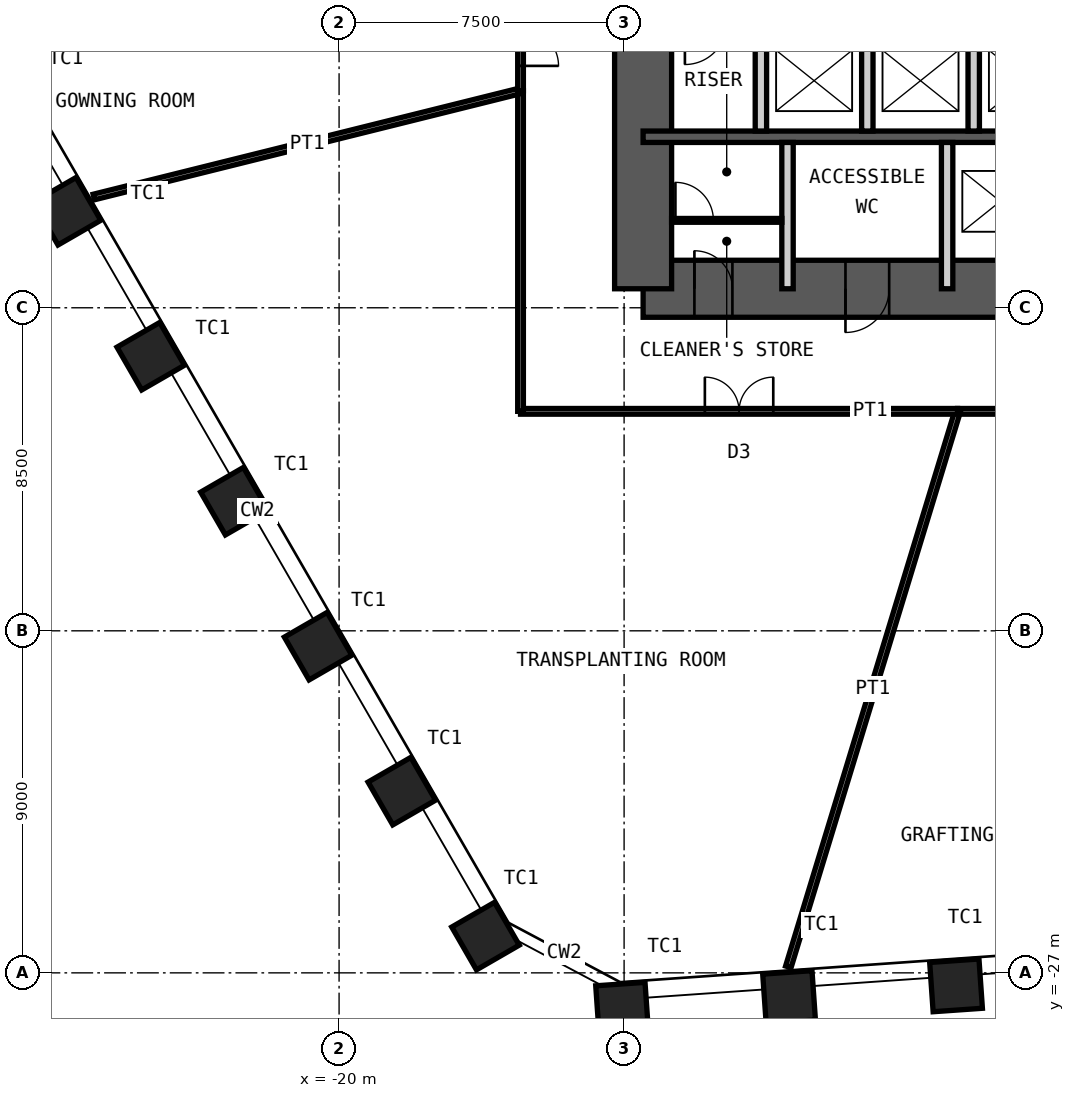
"""IFC4 building model, lengths in metres.
Left out: names, types, materials, properties, quantities, classifications, styles, units other than length and angle.
Written with IfcOpenShell. Run it as: python <this file> out.ifc"""

import sys

from ifc_helpers import new_model, si_unit, direction, frame, frame_2d, origin, origin_2d, place, context, subcontext, project, spatial, rectangle, hollow_rectangle, extrude, element, fill, save


model = new_model("IFC4")
c1 = context("Model", 3, precision=1e-05, world=origin(), true_north=direction((0.0, 1.0)))
c2 = subcontext(c1, "Body", "Model", "MODEL_VIEW")
j1 = project(units=[si_unit("LENGTHUNIT", "METRE"), si_unit("PLANEANGLEUNIT", "RADIAN")], contexts=[c1])
p1 = place(None, origin())
s1 = spatial("IfcSite", under=j1, at=p1, CompositionType="ELEMENT")
p2 = place(p1, origin())
s2 = spatial("IfcBuilding", under=s1, at=p2, CompositionType="ELEMENT")
p3 = place(p2, frame((0.0, 0.0, 27.0)))
s3 = spatial("IfcBuildingStorey", under=s2, at=p3, CompositionType="ELEMENT", Elevation=27.0)
for number, where, z_axis, x_axis in (
    (1, (-3.765, -27.329, 0.0), (0.0, 0.0, 1.0), (0.998, 0.07, 0.0)),
    (2, (-8.159, -27.636, 0.0), (0.0, 0.0, 1.0), (0.998, 0.07, 0.0)),
    (3, (-12.553, -27.944, 0.0), (0.0, 0.0, 1.0), (0.998, 0.07, 0.0)),
    (4, (-16.147, -26.033, 0.0), (0.0, 0.0, 1.0), (0.5, -0.866, 0.0)),
    (5, (-18.349, -22.218, 0.0), (0.0, 0.0, 1.0), (0.5, -0.866, 0.0)),
    (6, (-20.552, -18.404, 0.0), (0.0, 0.0, 1.0), (0.5, -0.866, 0.0)),
    (7, (-22.754, -14.589, 0.0), (0.0, 0.0, 1.0), (0.5, -0.866, 0.0)),
    (8, (-24.956, -10.775, 0.0), (0.0, 0.0, 1.0), (0.5, -0.866, 0.0)),
    (9, (-27.158, -6.96, 0.0), (0.0, 0.0, 1.0), (0.5, -0.866, 0.0)),
):
    element("IfcColumn", number, at=place(p3, frame(where, z_axis=z_axis, x_axis=x_axis)), inside=s3, PredefinedType="COLUMN", context=c2, shape_type="SweptSolid", body=[
        extrude(hollow_rectangle(XDim=1.3, YDim=1.3, WallThickness=0.1, at=origin_2d()), origin(), (0.0, 0.0, 1.0), 5.0),
    ])
p4 = place(p3, frame((-12.0, -9.0, 0.0), z_axis=(0.0, 0.0, 1.0), x_axis=(1.0, 0.0, 0.0)))
e10 = element("IfcWall", 10, at=p4, inside=s3, PredefinedType="SHEAR", context=c2, shape_type="SweptSolid", body=[
    extrude(rectangle(XDim=24.0, YDim=1.5, at=frame_2d((12.0, 0.0))), origin(), (0.0, 0.0, 1.0), 5.0),
])
p5 = place(p4, frame((1.35, 0.0, 0.0)))
e11 = element("IfcOpeningElement", 11, at=p5, cuts=e10, PredefinedType="OPENING", context=c2, shape_type="SweptSolid", body=[
    extrude(rectangle(XDim=1.0, YDim=2.1, at=frame_2d((0.5, 1.05))), frame((0.0, 0.76, 0.0), z_axis=(0.0, -1.0, 0.0), x_axis=(1.0, 0.0, 0.0)), (0.0, 0.0, 1.0), 1.52),
])
p6 = place(p4, frame((5.325, 0.0, 0.0)))
e12 = element("IfcOpeningElement", 12, at=p6, cuts=e10, PredefinedType="OPENING", context=c2, shape_type="SweptSolid", body=[
    extrude(rectangle(XDim=1.15, YDim=2.1, at=frame_2d((0.575, 1.05))), frame((0.0, 0.76, 0.0), z_axis=(0.0, -1.0, 0.0), x_axis=(1.0, 0.0, 0.0)), (0.0, 0.0, 1.0), 1.52),
])
p7 = place(p4, frame((12.6, 0.0, 0.0)))
e13 = element("IfcOpeningElement", 13, at=p7, cuts=e10, PredefinedType="OPENING", context=c2, shape_type="SweptSolid", body=[
    extrude(rectangle(XDim=1.0, YDim=2.1, at=frame_2d((0.5, 1.05))), frame((0.0, 0.76, 0.0), z_axis=(0.0, -1.0, 0.0), x_axis=(1.0, 0.0, 0.0)), (0.0, 0.0, 1.0), 1.52),
])
p8 = place(p3, frame((-12.0, -9.0, 0.0), z_axis=(0.0, 0.0, 1.0), x_axis=(0.0, 1.0, 0.0)))
e14 = element("IfcWall", 14, at=p8, inside=s3, PredefinedType="SHEAR", context=c2, shape_type="SweptSolid", body=[
    extrude(rectangle(XDim=18.0, YDim=1.5, at=frame_2d((9.0, 0.0))), origin(), (0.0, 0.0, 1.0), 5.0),
])
p9 = place(p8, frame((8.1, 0.0, 0.0)))
e15 = element("IfcOpeningElement", 15, at=p9, cuts=e14, PredefinedType="OPENING", context=c2, shape_type="SweptSolid", body=[
    extrude(rectangle(XDim=1.8, YDim=2.1, at=frame_2d((0.9, 1.05))), frame((0.0, 0.76, 0.0), z_axis=(0.0, -1.0, 0.0), x_axis=(1.0, 0.0, 0.0)), (0.0, 0.0, 1.0), 1.52),
])
p10 = place(p3, frame((-12.0, -5.0, 0.0), z_axis=(0.0, 0.0, 1.0), x_axis=(1.0, 0.0, 0.0)))
e16 = element("IfcWall", 16, at=p10, inside=s3, PredefinedType="SHEAR", context=c2, shape_type="SweptSolid", body=[
    extrude(rectangle(XDim=24.0, YDim=0.3, at=frame_2d((12.0, 0.0))), origin(), (0.0, 0.0, 1.0), 5.0),
])
for number, where, z_axis, x_axis in (
    (17, (-8.9, -4.85, 0.0), (0.0, 0.0, 1.0), (0.0, 1.0, 0.0)),
    (18, (-6.1, -4.85, 0.0), (0.0, 0.0, 1.0), (0.0, 1.0, 0.0)),
    (19, (-3.3, -4.85, 0.0), (0.0, 0.0, 1.0), (0.0, 1.0, 0.0)),
):
    element("IfcWall", number, at=place(p3, frame(where, z_axis=z_axis, x_axis=x_axis)), inside=s3, PredefinedType="PARTITIONING", context=c2, shape_type="SweptSolid", body=[
        extrude(rectangle(XDim=2.65, YDim=0.3, at=frame_2d((1.325, 0.0))), origin(), (0.0, 0.0, 1.0), 4.78),
    ])
for number, where, z_axis, x_axis in (
    (20, (-8.2, -9.0, 0.0), (0.0, 0.0, 1.0), (0.0, 1.0, 0.0)),
    (21, (-4.0, -9.0, 0.0), (0.0, 0.0, 1.0), (0.0, 1.0, 0.0)),
):
    element("IfcWall", number, at=place(p3, frame(where, z_axis=z_axis, x_axis=x_axis)), inside=s3, PredefinedType="PARTITIONING", context=c2, shape_type="SweptSolid", body=[
        extrude(rectangle(XDim=3.85, YDim=0.3, at=frame_2d((1.925, 0.0))), origin(), (0.0, 0.0, 1.0), 4.78),
    ])
p11 = place(p3, frame((-11.25, -7.2, 0.0), z_axis=(0.0, 0.0, 1.0), x_axis=(1.0, 0.0, 0.0)))
e22 = element("IfcWall", 22, at=p11, inside=s3, PredefinedType="PARTITIONING", context=c2, shape_type="SweptSolid", body=[
    extrude(rectangle(XDim=2.9, YDim=0.1, at=frame_2d((1.45, 0.0))), origin(), (0.0, 0.0, 1.0), 4.78),
])
p12 = place(p11, frame((0.1, 0.0, 0.0)))
e23 = element("IfcOpeningElement", 23, at=p12, cuts=e22, PredefinedType="OPENING", context=c2, shape_type="SweptSolid", body=[
    extrude(rectangle(XDim=1.0, YDim=2.4, at=frame_2d((0.5, 1.2))), frame((0.0, 0.06, 0.0), z_axis=(0.0, -1.0, 0.0), x_axis=(1.0, 0.0, 0.0)), (0.0, 0.0, 1.0), 0.12),
])
p13 = place(p3, frame((0.269, -12.225, 0.0), z_axis=(0.0, 0.0, 1.0), x_axis=(-1.0, 0.0, 0.0)))
e24 = element("IfcWall", 24, at=p13, inside=s3, PredefinedType="PARTITIONING", context=c2, shape_type="SweptSolid", body=[
    extrude(rectangle(XDim=3.994, YDim=0.15, at=frame_2d((1.997, 0.0))), origin(), (0.0, 0.0, 1.0), 4.8),
])
p14 = place(p13, frame((1.497, 0.0, 0.0)))
e25 = element("IfcOpeningElement", 25, at=p14, cuts=e24, PredefinedType="OPENING", context=c2, shape_type="SweptSolid", body=[
    extrude(rectangle(XDim=1.0, YDim=2.4, at=frame_2d((0.5, 1.2))), frame((0.0, 0.085, 0.0), z_axis=(0.0, -1.0, 0.0), x_axis=(1.0, 0.0, 0.0)), (0.0, 0.0, 1.0), 0.17),
])
p15 = place(p3, frame((-8.179, -26.843, 0.0), z_axis=(0.0, 0.0, 1.0), x_axis=(0.291465492753, 0.956581343397, 0.0)))
e26 = element("IfcWall", 26, at=p15, inside=s3, PredefinedType="PARTITIONING", context=c2, shape_type="SweptSolid", body=[
    extrude(rectangle(XDim=15.281, YDim=0.15, at=frame_2d((7.641, 0.0))), origin(), (0.0, 0.0, 1.0), 3.7),
])
p16 = place(p3, frame((-3.725, -12.225, 0.0), z_axis=(0.0, 0.0, 1.0), x_axis=(-1.0, 0.0, 0.0)))
e27 = element("IfcWall", 27, at=p16, inside=s3, PredefinedType="PARTITIONING", context=c2, shape_type="SweptSolid", body=[
    extrude(rectangle(XDim=11.5, YDim=0.15, at=frame_2d((5.75, 0.0))), origin(), (0.0, 0.0, 1.0), 4.8),
])
p17 = place(p16, frame((4.85, 0.0, 0.0)))
e28 = element("IfcOpeningElement", 28, at=p17, cuts=e27, PredefinedType="OPENING", context=c2, shape_type="SweptSolid", body=[
    extrude(rectangle(XDim=1.8, YDim=2.4, at=frame_2d((0.9, 1.2))), frame((0.0, 0.085, 0.0), z_axis=(0.0, -1.0, 0.0), x_axis=(1.0, 0.0, 0.0)), (0.0, 0.0, 1.0), 0.17),
])
p18 = place(p3, frame((-15.225, -12.225, 0.0), z_axis=(0.0, 0.0, 1.0), x_axis=(0.0, 1.0, 0.0)))
e29 = element("IfcWall", 29, at=p18, inside=s3, PredefinedType="PARTITIONING", context=c2, shape_type="SweptSolid", body=[
    extrude(rectangle(XDim=8.435, YDim=0.15, at=frame_2d((4.217, 0.0))), origin(), (0.0, 0.0, 1.0), 4.8),
])
p19 = place(p3, frame((-26.455, -6.586, 0.0), z_axis=(0.0, 0.0, 1.0), x_axis=(0.970383998101, 0.241567581083, 0.0)))
e30 = element("IfcWall", 30, at=p19, inside=s3, PredefinedType="PARTITIONING", context=c2, shape_type="SweptSolid", body=[
    extrude(rectangle(XDim=11.573, YDim=0.15, at=frame_2d((5.787, 0.0))), origin(), (0.0, 0.0, 1.0), 3.7),
])
p20 = place(p3, frame((-15.225, -3.79, 0.0), z_axis=(0.0, 0.0, 1.0), x_axis=(0.0, 1.0, 0.0)))
e31 = element("IfcWall", 31, at=p20, inside=s3, PredefinedType="PARTITIONING", context=c2, shape_type="SweptSolid", body=[
    extrude(rectangle(XDim=2.31, YDim=0.15, at=frame_2d((1.155, 0.0))), origin(), (0.0, 0.0, 1.0), 4.8),
])
p21 = place(p20, frame((0.655, 0.0, 0.0)))
e32 = element("IfcOpeningElement", 32, at=p21, cuts=e31, PredefinedType="OPENING", context=c2, shape_type="SweptSolid", body=[
    extrude(rectangle(XDim=1.0, YDim=2.4, at=frame_2d((0.5, 1.2))), frame((0.0, 0.085, 0.0), z_axis=(0.0, -1.0, 0.0), x_axis=(1.0, 0.0, 0.0)), (0.0, 0.0, 1.0), 0.17),
])
p22 = place(p3, frame((-28.655, -2.786, 0.0), z_axis=(0.0, 0.0, 1.0), x_axis=(0.995307331187, 0.096764231438, 0.0)))
e33 = element("IfcWall", 33, at=p22, inside=s3, PredefinedType="PARTITIONING", context=c2, shape_type="SweptSolid", body=[
    extrude(rectangle(XDim=13.493, YDim=0.15, at=frame_2d((6.747, 0.0))), origin(), (0.0, 0.0, 1.0), 3.7),
])
p23 = place(p5, origin())
e34 = element("IfcDoor", 34, at=p23, inside=s3, OperationType="SINGLE_SWING_RIGHT", PredefinedType="DOOR", context=c2, shape_type="SweptSolid", body=[
    extrude(rectangle(XDim=1.0, YDim=2.1, at=frame_2d((0.5, 1.05))), frame((0.0, 0.025, 0.0), z_axis=(0.0, -1.0, 0.0), x_axis=(1.0, 0.0, 0.0)), (0.0, 0.0, 1.0), 0.05),
])
fill(e11, e34)
p24 = place(p6, origin())
e35 = element("IfcDoor", 35, at=p24, inside=s3, OperationType="SINGLE_SWING_LEFT", PredefinedType="DOOR", context=c2, shape_type="SweptSolid", body=[
    extrude(rectangle(XDim=1.15, YDim=2.1, at=frame_2d((0.575, 1.05))), frame((0.0, 0.025, 0.0), z_axis=(0.0, -1.0, 0.0), x_axis=(1.0, 0.0, 0.0)), (0.0, 0.0, 1.0), 0.05),
])
fill(e12, e35)
p25 = place(p12, origin())
e36 = element("IfcDoor", 36, at=p25, inside=s3, OperationType="SINGLE_SWING_RIGHT", PredefinedType="DOOR", context=c2, shape_type="SweptSolid", body=[
    extrude(rectangle(XDim=1.0, YDim=2.4, at=frame_2d((0.5, 1.2))), frame((0.0, 0.025, 0.0), z_axis=(0.0, -1.0, 0.0), x_axis=(1.0, 0.0, 0.0)), (0.0, 0.0, 1.0), 0.05),
])
fill(e23, e36)
p26 = place(p17, origin())
e37 = element("IfcDoor", 37, at=p26, inside=s3, OperationType="DOUBLE_DOOR_DOUBLE_SWING", PredefinedType="DOOR", context=c2, shape_type="SweptSolid", body=[
    extrude(rectangle(XDim=1.8, YDim=2.4, at=frame_2d((0.9, 1.2))), frame((0.0, 0.025, 0.0), z_axis=(0.0, -1.0, 0.0), x_axis=(1.0, 0.0, 0.0)), (0.0, 0.0, 1.0), 0.05),
])
fill(e28, e37)
p27 = place(p21, origin())
e38 = element("IfcDoor", 38, at=p27, inside=s3, OperationType="SINGLE_SWING_LEFT", PredefinedType="DOOR", context=c2, shape_type="SweptSolid", body=[
    extrude(rectangle(XDim=1.0, YDim=2.4, at=frame_2d((0.5, 1.2))), frame((0.0, 0.025, 0.0), z_axis=(0.0, -1.0, 0.0), x_axis=(1.0, 0.0, 0.0)), (0.0, 0.0, 1.0), 0.05),
])
fill(e32, e38)
save(model, sys.argv[1])
